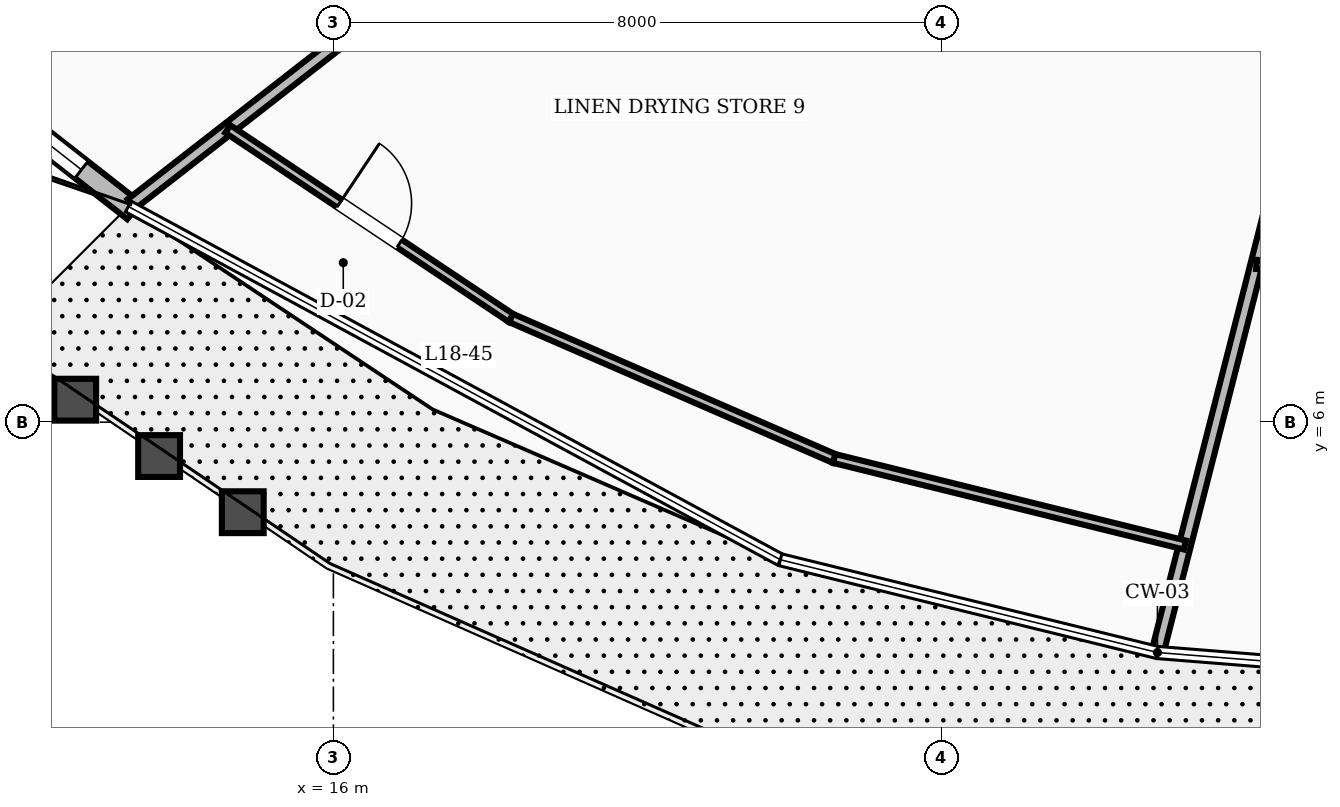
"""IFC4 building model, lengths in metres.
Left out: names, types, materials, properties, quantities, classifications, styles, units other than length and angle.
Written with IfcOpenShell. Run it as: python <this file> out.ifc"""

import sys

from ifc_helpers import new_model, si_unit, direction, frame, frame_2d, origin, place, context, subcontext, project, spatial, rectangle, extrude, element, fill, save


model = new_model("IFC4")
c1 = context("Model", 3, precision=1e-05, world=origin(), true_north=direction((0.0, 1.0)))
c2 = subcontext(c1, "Body", "Model", "MODEL_VIEW")
j1 = project(units=[si_unit("LENGTHUNIT", "METRE"), si_unit("PLANEANGLEUNIT", "RADIAN")], contexts=[c1])
p1 = place(None, origin())
s1 = spatial("IfcSite", under=j1, at=p1, CompositionType="ELEMENT")
p2 = place(p1, origin())
s2 = spatial("IfcBuilding", under=s1, at=p2, CompositionType="ELEMENT")
p3 = place(p2, frame((0.0, 0.0, 73.6)))
s3 = spatial("IfcBuildingStorey", under=s2, at=p3, CompositionType="ELEMENT", Elevation=73.6)
p4 = place(p3, frame((9.548, 11.776, 0.0), z_axis=(0.0, 0.0, 1.0), x_axis=(0.787476373369, -0.616344839668, 0.0)))
e1 = element("IfcWall", 1, at=p4, inside=s3, PredefinedType="STANDARD", context=c2, shape_type="SweptSolid", body=[
    extrude(rectangle(XDim=4.859, YDim=0.28, at=frame_2d((2.43, 0.0))), origin(), (0.0, 0.0, 1.0), 2.71),
])
p5 = place(p4, frame((0.784, 0.0, 0.8)))
e2 = element("IfcOpeningElement", 2, at=p5, cuts=e1, PredefinedType="OPENING", context=c2, shape_type="SweptSolid", body=[
    extrude(rectangle(XDim=3.2, YDim=1.65, at=frame_2d((1.6, 0.825))), frame((0.0, 0.15, 0.0), z_axis=(0.0, -1.0, 0.0), x_axis=(1.0, 0.0, 0.0)), (0.0, 0.0, 1.0), 0.3),
])
p6 = place(p3, frame((25.815, 11.589, 0.0), z_axis=(0.0, 0.0, 1.0), x_axis=(0.969653665365, -0.244482656326, 0.0)))
e3 = element("IfcWall", 3, at=p6, inside=s3, PredefinedType="SOLIDWALL", context=c2, shape_type="SweptSolid", body=[
    extrude(rectangle(XDim=3.127, YDim=0.16, at=frame_2d((1.563, 0.0))), origin(), (0.0, 0.0, 1.0), 2.71),
])
p7 = place(p3, frame((28.847, 10.824, 0.0), z_axis=(0.0, 0.0, 1.0), x_axis=(-0.247395351074, -0.968914619699, 0.0)))
e4 = element("IfcWall", 4, at=p7, inside=s3, PredefinedType="SOLIDWALL", context=c2, shape_type="SweptSolid", body=[
    extrude(rectangle(XDim=8.057, YDim=0.16, at=frame_2d((4.028, 0.0))), origin(), (0.0, 0.0, 1.0), 2.71),
])
p8 = place(p3, frame((28.145, 8.075, 0.0), z_axis=(0.0, 0.0, 1.0), x_axis=(0.996745655766, -0.080610779127, 0.0)))
e5 = element("IfcWall", 5, at=p8, inside=s3, PredefinedType="PARTITIONING", context=c2, shape_type="SweptSolid", body=[
    extrude(rectangle(XDim=3.868, YDim=0.12, at=frame_2d((1.934, 0.0))), origin(), (0.0, 0.0, 1.0), 2.71),
])
p9 = place(p8, frame((1.434, 0.0, 0.0)))
e6 = element("IfcOpeningElement", 6, at=p9, cuts=e5, PredefinedType="OPENING", context=c2, shape_type="SweptSolid", body=[
    extrude(rectangle(XDim=1.0, YDim=2.1, at=frame_2d((0.5, 1.05))), frame((0.0, 0.07, 0.0), z_axis=(0.0, -1.0, 0.0), x_axis=(1.0, 0.0, 0.0)), (0.0, 0.0, 1.0), 0.14),
])
p10 = place(p3, frame((20.572, 14.501, 0.0), z_axis=(0.0, 0.0, 1.0), x_axis=(-0.788888678139, -0.614536128722, 0.0)))
e7 = element("IfcWall", 7, at=p10, inside=s3, PredefinedType="SOLIDWALL", context=c2, shape_type="SweptSolid", body=[
    extrude(rectangle(XDim=9.165, YDim=0.16, at=frame_2d((4.583, 0.0))), origin(), (0.0, 0.0, 1.0), 2.71),
])
p11 = place(p3, frame((14.611, 9.857, 0.0), z_axis=(0.0, 0.0, 1.0), x_axis=(0.831748375698, -0.555152807364, 0.0)))
e8 = element("IfcWall", 8, at=p11, inside=s3, PredefinedType="PARTITIONING", context=c2, shape_type="SweptSolid", body=[
    extrude(rectangle(XDim=4.48, YDim=0.12, at=frame_2d((2.24, 0.0))), origin(), (0.0, 0.0, 1.0), 2.71),
])
p12 = place(p11, frame((1.765, 0.0, 0.0)))
e9 = element("IfcOpeningElement", 9, at=p12, cuts=e8, PredefinedType="OPENING", context=c2, shape_type="SweptSolid", body=[
    extrude(rectangle(XDim=0.95, YDim=2.1, at=frame_2d((0.475, 1.05))), frame((0.0, 0.07, 0.0), z_axis=(0.0, -1.0, 0.0), x_axis=(1.0, 0.0, 0.0)), (0.0, 0.0, 1.0), 0.14),
])
p13 = place(p3, frame((18.337, 7.37, 0.0), z_axis=(0.0, 0.0, 1.0), x_axis=(0.917084288263, -0.398693376195, 0.0)))
e10 = element("IfcWall", 10, at=p13, inside=s3, PredefinedType="PARTITIONING", context=c2, shape_type="SweptSolid", body=[
    extrude(rectangle(XDim=4.636, YDim=0.12, at=frame_2d((2.318, 0.0))), origin(), (0.0, 0.0, 1.0), 2.71),
])
p14 = place(p3, frame((22.589, 5.521, 0.0), z_axis=(0.0, 0.0, 1.0), x_axis=(0.970887419155, -0.239536258896, 0.0)))
e11 = element("IfcWall", 11, at=p14, inside=s3, PredefinedType="PARTITIONING", context=c2, shape_type="SweptSolid", body=[
    extrude(rectangle(XDim=4.752, YDim=0.12, at=frame_2d((2.376, 0.0))), origin(), (0.0, 0.0, 1.0), 2.71),
])
p15 = place(p5, origin())
e12 = element("IfcWindow", 12, at=p15, inside=s3, PartitioningType="SINGLE_PANEL", PredefinedType="WINDOW", context=c2, shape_type="SweptSolid", body=[
    extrude(rectangle(XDim=3.2, YDim=1.65, at=frame_2d((1.6, 0.825))), frame((0.0, 0.03, 0.0), z_axis=(0.0, -1.0, 0.0), x_axis=(1.0, 0.0, 0.0)), (0.0, 0.0, 1.0), 0.06),
])
fill(e2, e12)
p16 = place(p12, origin())
e13 = element("IfcDoor", 13, at=p16, inside=s3, OperationType="SINGLE_SWING_LEFT", PredefinedType="DOOR", context=c2, shape_type="SweptSolid", body=[
    extrude(rectangle(XDim=0.95, YDim=2.1, at=frame_2d((0.475, 1.05))), frame((0.0, 0.025, 0.0), z_axis=(0.0, -1.0, 0.0), x_axis=(1.0, 0.0, 0.0)), (0.0, 0.0, 1.0), 0.05),
])
fill(e9, e13)
save(model, sys.argv[1])
